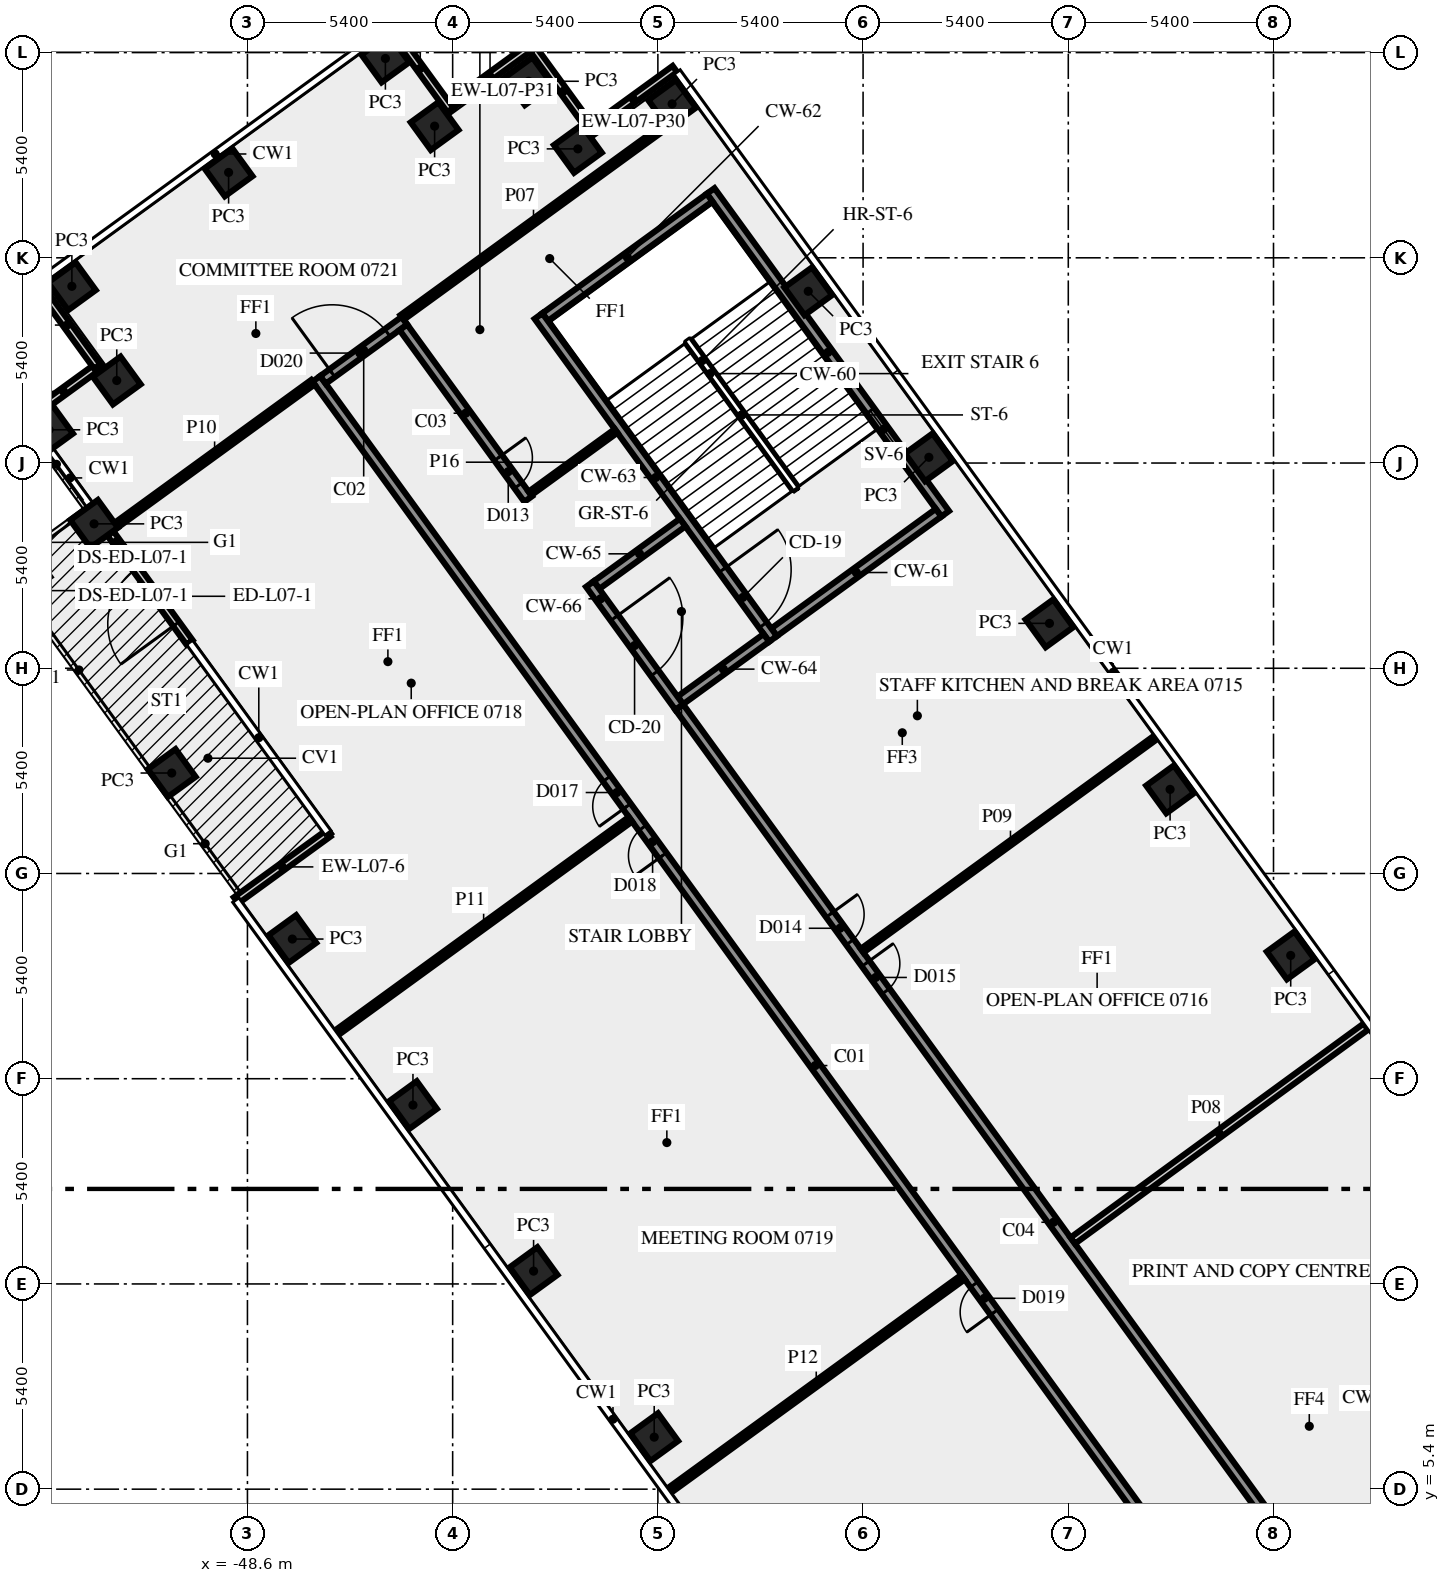
"""IFC4 building model, lengths in metres.
Left out: names, types, materials, properties, quantities, classifications, styles, units other than length and angle.
Written with IfcOpenShell. Run it as: python <this file> out.ifc"""

import sys

from ifc_helpers import new_model, si_unit, direction, frame, frame_2d, origin, origin_2d, place, context, subcontext, project, spatial, rectangle, extrude, element, fill, save


model = new_model("IFC4")
c1 = context("Model", 3, precision=1e-05, world=origin(), true_north=direction((0.0, 1.0)))
c2 = subcontext(c1, "Body", "Model", "MODEL_VIEW")
j1 = project(units=[si_unit("LENGTHUNIT", "METRE"), si_unit("PLANEANGLEUNIT", "RADIAN")], contexts=[c1])
p1 = place(None, origin())
s1 = spatial("IfcSite", under=j1, at=p1, CompositionType="ELEMENT")
p2 = place(p1, origin())
s2 = spatial("IfcBuilding", under=s1, at=p2, CompositionType="ELEMENT")
p3 = place(p2, frame((0.0, 0.0, 35.0)))
s3 = spatial("IfcBuildingStorey", under=s2, at=p3, CompositionType="ELEMENT", Elevation=35.0)
for number, where, z_axis, x_axis in (
    (1, (-21.147, 19.444, 0.0), (0.0, 0.0, 1.0), (-0.588, 0.809, 0.0)),
    (2, (-24.321, 23.812, 0.0), (0.0, 0.0, 1.0), (-0.588, 0.809, 0.0)),
    (3, (-27.495, 28.181, 0.0), (0.0, 0.0, 1.0), (-0.588, 0.809, 0.0)),
    (4, (-30.669, 32.55, 0.0), (0.0, 0.0, 1.0), (-0.588, 0.809, 0.0)),
    (5, (-33.843, 36.919, 0.0), (0.0, 0.0, 1.0), (-0.588, 0.809, 0.0)),
    (6, (-37.425, 41.85, 0.0), (0.0, 0.0, 1.0), (-0.588, 0.809, 0.0)),
    (7, (-39.906, 40.666, 0.0), (0.0, 0.0, 1.0), (-0.588, 0.809, 0.0)),
    (8, (-41.2, 42.445, 0.0), (0.0, 0.0, 1.0), (-0.588, 0.809, 0.0)),
    (9, (-43.675, 41.265, 0.0), (0.0, 0.0, 1.0), (-0.809, -0.588, 0.0)),
    (10, (-44.97, 43.045, 0.0), (0.0, 0.0, 1.0), (-0.809, -0.588, 0.0)),
    (11, (-49.096, 40.047, 0.0), (0.0, 0.0, 1.0), (-0.809, -0.588, 0.0)),
    (12, (-53.22, 37.05, 0.0), (0.0, 0.0, 1.0), (0.588, -0.809, 0.0)),
    (13, (-52.039, 34.571, 0.0), (0.0, 0.0, 1.0), (-0.809, -0.588, 0.0)),
    (14, (-53.82, 33.275, 0.0), (0.0, 0.0, 1.0), (0.588, -0.809, 0.0)),
    (15, (-52.636, 30.8, 0.0), (0.0, 0.0, 1.0), (-0.809, -0.588, 0.0)),
    (16, (-50.592, 24.243, 0.0), (0.0, 0.0, 1.0), (0.588, -0.809, 0.0)),
    (17, (-47.418, 19.875, 0.0), (0.0, 0.0, 1.0), (0.588, -0.809, 0.0)),
    (18, (-44.244, 15.506, 0.0), (0.0, 0.0, 1.0), (0.588, -0.809, 0.0)),
    (19, (-41.07, 11.137, 0.0), (0.0, 0.0, 1.0), (0.588, -0.809, 0.0)),
    (20, (-37.896, 6.769, 0.0), (0.0, 0.0, 1.0), (0.588, -0.809, 0.0)),
):
    element("IfcColumn", number, at=place(p3, frame(where, z_axis=z_axis, x_axis=x_axis)), inside=s3, PredefinedType="COLUMN", context=c2, shape_type="SweptSolid", body=[
        extrude(rectangle(XDim=0.9, YDim=0.9, at=origin_2d()), origin(), (0.0, 0.0, 1.0), 3.65),
    ])
p4 = place(p3, frame((-52.465, 34.987, 0.0), z_axis=(0.0, 0.0, 1.0), x_axis=(-0.809026317077, -0.587772420479, 0.0)))
e21 = element("IfcWall", 21, at=p4, inside=s3, PredefinedType="SOLIDWALL", context=c2, shape_type="SweptSolid", body=[
    extrude(rectangle(XDim=2.4, YDim=0.2, at=frame_2d((1.2, 0.0))), origin(), (0.0, 0.0, 1.0), 3.65),
])
p5 = place(p3, frame((-50.123, 27.68, 0.0), z_axis=(0.0, 0.0, 1.0), x_axis=(-0.587755461469, 0.809038637837, 0.0)))
e22 = element("IfcWall", 22, at=p5, inside=s3, PredefinedType="SOLIDWALL", context=c2, shape_type="SweptSolid", body=[
    extrude(rectangle(XDim=3.0, YDim=0.2, at=frame_2d((1.5, 0.0))), origin(), (0.0, 0.0, 1.0), 3.65),
])
p6 = place(p5, frame((0.6, 0.0, 0.0)))
e23 = element("IfcOpeningElement", 23, at=p6, cuts=e22, PredefinedType="OPENING", context=c2, shape_type="SweptSolid", body=[
    extrude(rectangle(XDim=1.8, YDim=2.4, at=frame_2d((0.9, 1.2))), frame((0.0, 0.11, 0.0), z_axis=(0.0, -1.0, 0.0), x_axis=(1.0, 0.0, 0.0)), (0.0, 0.0, 1.0), 0.22),
])
p7 = place(p3, frame((-46.472, 22.655, 0.0), z_axis=(0.0, 0.0, 1.0), x_axis=(-0.809038637837, -0.587755461469, 0.0)))
e24 = element("IfcWall", 24, at=p7, inside=s3, PredefinedType="SOLIDWALL", context=c2, shape_type="SweptSolid", body=[
    extrude(rectangle(XDim=3.0, YDim=0.2, at=frame_2d((1.5, 0.0))), origin(), (0.0, 0.0, 1.0), 3.65),
])
p8 = place(p3, frame((-37.353, 42.768, 0.0), z_axis=(0.0, 0.0, 1.0), x_axis=(-0.809033161865, -0.587762999008, 0.0)))
e25 = element("IfcWall", 25, at=p8, inside=s3, PredefinedType="SOLIDWALL", context=c2, shape_type="SweptSolid", body=[
    extrude(rectangle(XDim=2.7, YDim=0.2, at=frame_2d((1.35, 0.0))), origin(), (0.0, 0.0, 1.0), 3.65),
])
p9 = place(p3, frame((-39.488, 41.094, 0.0), z_axis=(0.0, 0.0, 1.0), x_axis=(-0.587806000234, 0.809001919707, 0.0)))
e26 = element("IfcWall", 26, at=p9, inside=s3, PredefinedType="SOLIDWALL", context=c2, shape_type="SweptSolid", body=[
    extrude(rectangle(XDim=2.7, YDim=0.2, at=frame_2d((1.35, 0.0))), origin(), (0.0, 0.0, 1.0), 3.65),
])
for number, where, z_axis, x_axis in (
    (27, (-41.124, 43.366, 0.0), (0.0, 0.0, 1.0), (-0.809, -0.588, 0.0)),
    (28, (-43.259, 41.691, 0.0), (0.0, 0.0, 1.0), (-0.588, 0.809, 0.0)),
    (29, (-54.14, 37.123, 0.0), (0.0, 0.0, 1.0), (0.588, -0.809, 0.0)),
):
    element("IfcWall", number, at=place(p3, frame(where, z_axis=z_axis, x_axis=x_axis)), inside=s3, PredefinedType="SOLIDWALL", context=c2, shape_type="SweptSolid", body=[
        extrude(rectangle(XDim=2.7, YDim=0.2, at=frame_2d((1.35, 0.0))), origin(), (0.0, 0.0, 1.0), 3.65),
    ])
p10 = place(p3, frame((-30.24, 31.064, 0.0), z_axis=(0.0, 0.0, 1.0), x_axis=(-0.587795589702, 0.809009483706, 0.0)))
e30 = element("IfcWall", 30, at=p10, inside=s3, PredefinedType="SHEAR", context=c2, shape_type="SweptSolid", body=[
    extrude(rectangle(XDim=10.5, YDim=0.25, at=frame_2d((5.25, 0.0))), origin(), (0.0, 0.0, 1.0), 3.65),
])
p11 = place(p10, frame((2.15, 0.0, 1.0)))
e31 = element("IfcOpeningElement", 31, at=p11, cuts=e30, PredefinedType="OPENING", context=c2, shape_type="SweptSolid", body=[
    extrude(rectangle(XDim=1.2, YDim=1.2, at=frame_2d((0.6, 0.6))), frame((0.0, 0.135, 0.0), z_axis=(0.0, -1.0, 0.0), x_axis=(1.0, 0.0, 0.0)), (0.0, 0.0, 1.0), 0.27),
])
p12 = place(p3, frame((-30.414, 31.092, 0.0), z_axis=(0.0, 0.0, 1.0), x_axis=(-0.8089984606, -0.587810760999, 0.0)))
e32 = element("IfcWall", 32, at=p12, inside=s3, PredefinedType="SHEAR", context=c2, shape_type="SweptSolid", body=[
    extrude(rectangle(XDim=5.35, YDim=0.25, at=frame_2d((2.675, 0.0))), origin(), (0.0, 0.0, 1.0), 3.65),
])
p13 = place(p3, frame((-36.439, 39.384, 0.0), z_axis=(0.0, 0.0, 1.0), x_axis=(-0.809020161303, -0.587780893365, 0.0)))
e33 = element("IfcWall", 33, at=p13, inside=s3, PredefinedType="SHEAR", context=c2, shape_type="SweptSolid", body=[
    extrude(rectangle(XDim=5.35, YDim=0.25, at=frame_2d((2.675, 0.0))), origin(), (0.0, 0.0, 1.0), 3.65),
])
p14 = place(p3, frame((-40.942, 36.267, 0.0), z_axis=(0.0, 0.0, 1.0), x_axis=(0.587795589702, -0.809009483706, 0.0)))
e34 = element("IfcWall", 34, at=p14, inside=s3, PredefinedType="SHEAR", context=c2, shape_type="SweptSolid", body=[
    extrude(rectangle(XDim=10.5, YDim=0.25, at=frame_2d((5.25, 0.0))), origin(), (0.0, 0.0, 1.0), 3.65),
])
p15 = place(p14, frame((8.25, 0.0, 0.0)))
e35 = element("IfcOpeningElement", 35, at=p15, cuts=e34, PredefinedType="OPENING", context=c2, shape_type="SweptSolid", body=[
    extrude(rectangle(XDim=1.8, YDim=2.1, at=frame_2d((0.9, 1.05))), frame((0.0, 0.135, 0.0), z_axis=(0.0, -1.0, 0.0), x_axis=(1.0, 0.0, 0.0)), (0.0, 0.0, 1.0), 0.27),
])
for number, where, z_axis, x_axis in (
    (36, (-34.945, 27.8, 0.0), (0.0, 0.0, 1.0), (-0.809, -0.588, 0.0)),
    (37, (-37.149, 30.834, 0.0), (0.0, 0.0, 1.0), (-0.809, -0.588, 0.0)),
):
    element("IfcWall", number, at=place(p3, frame(where, z_axis=z_axis, x_axis=x_axis)), inside=s3, PredefinedType="SHEAR", context=c2, shape_type="SweptSolid", body=[
        extrude(rectangle(XDim=2.8, YDim=0.25, at=frame_2d((1.4, 0.0))), origin(), (0.0, 0.0, 1.0), 3.65),
    ])
p16 = place(p3, frame((-39.589, 29.216, 0.0), z_axis=(0.0, 0.0, 1.0), x_axis=(0.587772420479, -0.809026317077, 0.0)))
e38 = element("IfcWall", 38, at=p16, inside=s3, PredefinedType="SHEAR", context=c2, shape_type="SweptSolid", body=[
    extrude(rectangle(XDim=4.0, YDim=0.25, at=frame_2d((2.0, 0.0))), origin(), (0.0, 0.0, 1.0), 3.65),
])
p17 = place(p16, frame((1.1, 0.0, 0.0)))
e39 = element("IfcOpeningElement", 39, at=p17, cuts=e38, PredefinedType="OPENING", context=c2, shape_type="SweptSolid", body=[
    extrude(rectangle(XDim=1.8, YDim=2.1, at=frame_2d((0.9, 1.05))), frame((0.0, 0.135, 0.0), z_axis=(0.0, -1.0, 0.0), x_axis=(1.0, 0.0, 0.0)), (0.0, 0.0, 1.0), 0.27),
])
p18 = place(p3, frame((-20.531, -1.523, 0.0), z_axis=(0.0, 0.0, 1.0), x_axis=(-0.587784593204, 0.809017473231, 0.0)))
e40 = element("IfcWall", 40, at=p18, inside=s3, PredefinedType="SOLIDWALL", context=c2, shape_type="SweptSolid", body=[
    extrude(rectangle(XDim=44.67, YDim=0.25, at=frame_2d((22.335, 0.0))), origin(), (0.0, 0.0, 1.0), 3.65),
])
p19 = place(p18, frame((30.765, 0.0, 0.0)))
e41 = element("IfcOpeningElement", 41, at=p19, cuts=e40, PredefinedType="OPENING", context=c2, shape_type="SweptSolid", body=[
    extrude(rectangle(XDim=0.9, YDim=2.1, at=frame_2d((0.45, 1.05))), frame((0.0, 0.135, 0.0), z_axis=(0.0, -1.0, 0.0), x_axis=(1.0, 0.0, 0.0)), (0.0, 0.0, 1.0), 0.27),
])
p20 = place(p18, frame((14.316, 0.0, 0.0)))
e42 = element("IfcOpeningElement", 42, at=p20, cuts=e40, PredefinedType="OPENING", context=c2, shape_type="SweptSolid", body=[
    extrude(rectangle(XDim=0.9, YDim=2.1, at=frame_2d((0.45, 1.05))), frame((0.0, 0.135, 0.0), z_axis=(0.0, -1.0, 0.0), x_axis=(1.0, 0.0, 0.0)), (0.0, 0.0, 1.0), 0.27),
])
p21 = place(p18, frame((29.166, 0.0, 0.0)))
e43 = element("IfcOpeningElement", 43, at=p21, cuts=e40, PredefinedType="OPENING", context=c2, shape_type="SweptSolid", body=[
    extrude(rectangle(XDim=0.9, YDim=2.1, at=frame_2d((0.45, 1.05))), frame((0.0, 0.135, 0.0), z_axis=(0.0, -1.0, 0.0), x_axis=(1.0, 0.0, 0.0)), (0.0, 0.0, 1.0), 0.27),
])
p22 = place(p3, frame((-46.613, 34.588, 0.0), z_axis=(0.0, 0.0, 1.0), x_axis=(0.808994936898, 0.587815610607, 0.0)))
e44 = element("IfcWall", 44, at=p22, inside=s3, PredefinedType="SOLIDWALL", context=c2, shape_type="SweptSolid", body=[
    extrude(rectangle(XDim=2.65, YDim=0.25, at=frame_2d((1.325, 0.0))), origin(), (0.0, 0.0, 1.0), 3.65),
])
p23 = place(p22, frame((0.299, 0.0, 0.0)))
e45 = element("IfcOpeningElement", 45, at=p23, cuts=e44, PredefinedType="OPENING", context=c2, shape_type="SweptSolid", body=[
    extrude(rectangle(XDim=1.8, YDim=2.1, at=frame_2d((0.9, 1.05))), frame((0.0, 0.135, 0.0), z_axis=(0.0, -1.0, 0.0), x_axis=(1.0, 0.0, 0.0)), (0.0, 0.0, 1.0), 0.27),
])
p24 = place(p3, frame((-44.497, 35.971, 0.0), z_axis=(0.0, 0.0, 1.0), x_axis=(0.587742866856, -0.809047787501, 0.0)))
e46 = element("IfcWall", 46, at=p24, inside=s3, PredefinedType="SOLIDWALL", context=c2, shape_type="SweptSolid", body=[
    extrude(rectangle(XDim=5.586, YDim=0.25, at=frame_2d((2.793, 0.0))), origin(), (0.0, 0.0, 1.0), 3.65),
])
p25 = place(p24, frame((4.245, 0.0, 0.0)))
e47 = element("IfcOpeningElement", 47, at=p25, cuts=e46, PredefinedType="OPENING", context=c2, shape_type="SweptSolid", body=[
    extrude(rectangle(XDim=0.9, YDim=2.1, at=frame_2d((0.45, 1.05))), frame((0.0, 0.135, 0.0), z_axis=(0.0, -1.0, 0.0), x_axis=(1.0, 0.0, 0.0)), (0.0, 0.0, 1.0), 0.27),
])
p26 = place(p3, frame((-37.232, 25.972, 0.0), z_axis=(0.0, 0.0, 1.0), x_axis=(0.587786323093, -0.809016216391, 0.0)))
e48 = element("IfcWall", 48, at=p26, inside=s3, PredefinedType="SOLIDWALL", context=c2, shape_type="SweptSolid", body=[
    extrude(rectangle(XDim=33.493, YDim=0.25, at=frame_2d((16.747, 0.0))), origin(), (0.0, 0.0, 1.0), 3.65),
])
p27 = place(p26, frame((8.335, 0.0, 0.0)))
e49 = element("IfcOpeningElement", 49, at=p27, cuts=e48, PredefinedType="OPENING", context=c2, shape_type="SweptSolid", body=[
    extrude(rectangle(XDim=0.9, YDim=2.1, at=frame_2d((0.45, 1.05))), frame((0.0, 0.135, 0.0), z_axis=(0.0, -1.0, 0.0), x_axis=(1.0, 0.0, 0.0)), (0.0, 0.0, 1.0), 0.27),
])
p28 = place(p26, frame((29.152, 0.0, 0.0)))
e50 = element("IfcOpeningElement", 50, at=p28, cuts=e48, PredefinedType="OPENING", context=c2, shape_type="SweptSolid", body=[
    extrude(rectangle(XDim=0.9, YDim=2.1, at=frame_2d((0.45, 1.05))), frame((0.0, 0.135, 0.0), z_axis=(0.0, -1.0, 0.0), x_axis=(1.0, 0.0, 0.0)), (0.0, 0.0, 1.0), 0.27),
])
p29 = place(p26, frame((6.735, 0.0, 0.0)))
e51 = element("IfcOpeningElement", 51, at=p29, cuts=e48, PredefinedType="OPENING", context=c2, shape_type="SweptSolid", body=[
    extrude(rectangle(XDim=0.9, YDim=2.1, at=frame_2d((0.45, 1.05))), frame((0.0, 0.135, 0.0), z_axis=(0.0, -1.0, 0.0), x_axis=(1.0, 0.0, 0.0)), (0.0, 0.0, 1.0), 0.27),
])
p30 = place(p3, frame((-37.614, 41.257, 0.0), z_axis=(0.0, 0.0, 1.0), x_axis=(-0.808991595707, -0.587820208972, 0.0)))
e52 = element("IfcWall", 52, at=p30, inside=s3, PredefinedType="PARTITIONING", context=c2, shape_type="SweptSolid", body=[
    extrude(rectangle(XDim=8.551, YDim=0.15, at=frame_2d((4.275, 0.0))), origin(), (0.0, 0.0, 1.0), 3.65),
])
p31 = place(p3, frame((-26.882, 11.94, 0.0), z_axis=(0.0, 0.0, 1.0), x_axis=(0.807664588563, 0.589642190131, 0.0)))
e53 = element("IfcWall", 53, at=p31, inside=s3, PredefinedType="SOLIDWALL", context=c2, shape_type="SweptSolid", body=[
    extrude(rectangle(XDim=9.55, YDim=0.2, at=frame_2d((4.775, 0.0))), origin(), (0.0, 0.0, 1.0), 2.75),
])
p32 = place(p3, frame((-24.618, 25.242, 0.0), z_axis=(0.0, 0.0, 1.0), x_axis=(-0.809002920164, -0.587804623294, 0.0)))
e54 = element("IfcWall", 54, at=p32, inside=s3, PredefinedType="PARTITIONING", context=c2, shape_type="SweptSolid", body=[
    extrude(rectangle(XDim=9.651, YDim=0.12, at=frame_2d((4.825, 0.0))), origin(), (0.0, 0.0, 1.0), 2.75),
])
p33 = place(p3, frame((-46.877, 34.526, 0.0), z_axis=(0.0, 0.0, 1.0), x_axis=(-0.809011722304, -0.587792508607, 0.0)))
e55 = element("IfcWall", 55, at=p33, inside=s3, PredefinedType="PARTITIONING", context=c2, shape_type="SweptSolid", body=[
    extrude(rectangle(XDim=6.394, YDim=0.15, at=frame_2d((3.197, 0.0))), origin(), (0.0, 0.0, 1.0), 3.65),
])
p34 = place(p3, frame((-46.248, 17.413, 0.0), z_axis=(0.0, 0.0, 1.0), x_axis=(0.80900684162, 0.587799226107, 0.0)))
e56 = element("IfcWall", 56, at=p34, inside=s3, PredefinedType="PARTITIONING", context=c2, shape_type="SweptSolid", body=[
    extrude(rectangle(XDim=9.55, YDim=0.15, at=frame_2d((4.775, 0.0))), origin(), (0.0, 0.0, 1.0), 2.75),
])
p35 = place(p3, frame((-29.769, 10.98, 0.0), z_axis=(0.0, 0.0, 1.0), x_axis=(-0.809048817734, -0.587741448702, 0.0)))
e57 = element("IfcWall", 57, at=p35, inside=s3, PredefinedType="PARTITIONING", context=c2, shape_type="SweptSolid", body=[
    extrude(rectangle(XDim=9.55, YDim=0.15, at=frame_2d((4.775, 0.0))), origin(), (0.0, 0.0, 1.0), 2.75),
])
p36 = place(p3, frame((-41.166, 31.599, 0.0), z_axis=(0.0, 0.0, 1.0), x_axis=(0.809090262332, 0.587684394381, 0.0)))
e58 = element("IfcWall", 58, at=p36, inside=s3, PredefinedType="PARTITIONING", context=c2, shape_type="SweptSolid", body=[
    extrude(rectangle(XDim=2.801, YDim=0.12, at=frame_2d((1.4, 0.0))), origin(), (0.0, 0.0, 1.0), 3.65),
])
p37 = place(p3, frame((-51.887, 30.107, 0.0), z_axis=(0.0, 0.0, 1.0), x_axis=(-0.587825586486, 0.808987688332, 0.0)))
e59 = element("IfcWall", 59, at=p37, inside=s3, PredefinedType="SOLIDWALL", context=c2, shape_type="SweptSolid", body=[
    extrude(rectangle(XDim=0.545, YDim=0.2, at=frame_2d((0.273, 0.0))), origin(), (0.0, 0.0, 1.0), 3.65),
])
p38 = place(p6, origin())
e60 = element("IfcDoor", 60, at=p38, inside=s3, OperationType="DOUBLE_DOOR_SINGLE_SWING", PredefinedType="DOOR", context=c2, shape_type="SweptSolid", body=[
    extrude(rectangle(XDim=1.8, YDim=2.4, at=frame_2d((0.9, 1.2))), frame((0.0, 0.025, 0.0), z_axis=(0.0, -1.0, 0.0), x_axis=(1.0, 0.0, 0.0)), (0.0, 0.0, 1.0), 0.05),
])
fill(e23, e60)
p39 = place(p11, origin())
e61 = element("IfcWindow", 61, at=p39, inside=s3, PartitioningType="SINGLE_PANEL", PredefinedType="WINDOW", context=c2, shape_type="SweptSolid", body=[
    extrude(rectangle(XDim=1.2, YDim=1.2, at=frame_2d((0.6, 0.6))), frame((0.0, 0.03, 0.0), z_axis=(0.0, -1.0, 0.0), x_axis=(1.0, 0.0, 0.0)), (0.0, 0.0, 1.0), 0.06),
])
fill(e31, e61)
p40 = place(p15, origin())
e62 = element("IfcDoor", 62, at=p40, inside=s3, OperationType="DOUBLE_DOOR_SINGLE_SWING", PredefinedType="DOOR", context=c2, shape_type="SweptSolid", body=[
    extrude(rectangle(XDim=1.8, YDim=2.1, at=frame_2d((0.9, 1.05))), frame((0.0, 0.025, 0.0), z_axis=(0.0, -1.0, 0.0), x_axis=(1.0, 0.0, 0.0)), (0.0, 0.0, 1.0), 0.05),
])
fill(e35, e62)
p41 = place(p17, origin())
e63 = element("IfcDoor", 63, at=p41, inside=s3, OperationType="DOUBLE_DOOR_SINGLE_SWING", PredefinedType="DOOR", context=c2, shape_type="SweptSolid", body=[
    extrude(rectangle(XDim=1.8, YDim=2.1, at=frame_2d((0.9, 1.05))), frame((0.0, 0.025, 0.0), z_axis=(0.0, -1.0, 0.0), x_axis=(1.0, 0.0, 0.0)), (0.0, 0.0, 1.0), 0.05),
])
fill(e39, e63)
p42 = place(p25, origin())
e64 = element("IfcDoor", 64, at=p42, inside=s3, OperationType="SINGLE_SWING_RIGHT", PredefinedType="DOOR", context=c2, shape_type="SweptSolid", body=[
    extrude(rectangle(XDim=0.9, YDim=2.1, at=frame_2d((0.45, 1.05))), frame((0.0, 0.025, 0.0), z_axis=(0.0, -1.0, 0.0), x_axis=(1.0, 0.0, 0.0)), (0.0, 0.0, 1.0), 0.05),
])
fill(e47, e64)
p43 = place(p27, origin())
e65 = element("IfcDoor", 65, at=p43, inside=s3, OperationType="SINGLE_SWING_LEFT", PredefinedType="DOOR", context=c2, shape_type="SweptSolid", body=[
    extrude(rectangle(XDim=0.9, YDim=2.1, at=frame_2d((0.45, 1.05))), frame((0.0, 0.025, 0.0), z_axis=(0.0, -1.0, 0.0), x_axis=(1.0, 0.0, 0.0)), (0.0, 0.0, 1.0), 0.05),
])
fill(e49, e65)
p44 = place(p19, origin())
e66 = element("IfcDoor", 66, at=p44, inside=s3, OperationType="SINGLE_SWING_LEFT", PredefinedType="DOOR", context=c2, shape_type="SweptSolid", body=[
    extrude(rectangle(XDim=0.9, YDim=2.1, at=frame_2d((0.45, 1.05))), frame((0.0, 0.025, 0.0), z_axis=(0.0, -1.0, 0.0), x_axis=(1.0, 0.0, 0.0)), (0.0, 0.0, 1.0), 0.05),
])
fill(e41, e66)
p45 = place(p20, origin())
e67 = element("IfcDoor", 67, at=p45, inside=s3, OperationType="SINGLE_SWING_RIGHT", PredefinedType="DOOR", context=c2, shape_type="SweptSolid", body=[
    extrude(rectangle(XDim=0.9, YDim=2.1, at=frame_2d((0.45, 1.05))), frame((0.0, 0.025, 0.0), z_axis=(0.0, -1.0, 0.0), x_axis=(1.0, 0.0, 0.0)), (0.0, 0.0, 1.0), 0.05),
])
fill(e42, e67)
p46 = place(p23, origin())
e68 = element("IfcDoor", 68, at=p46, inside=s3, OperationType="DOUBLE_DOOR_SINGLE_SWING", PredefinedType="DOOR", context=c2, shape_type="SweptSolid", body=[
    extrude(rectangle(XDim=1.8, YDim=2.1, at=frame_2d((0.9, 1.05))), frame((0.0, 0.025, 0.0), z_axis=(0.0, -1.0, 0.0), x_axis=(1.0, 0.0, 0.0)), (0.0, 0.0, 1.0), 0.05),
])
fill(e45, e68)
p47 = place(p21, origin())
e69 = element("IfcDoor", 69, at=p47, inside=s3, OperationType="SINGLE_SWING_RIGHT", PredefinedType="DOOR", context=c2, shape_type="SweptSolid", body=[
    extrude(rectangle(XDim=0.9, YDim=2.1, at=frame_2d((0.45, 1.05))), frame((0.0, 0.025, 0.0), z_axis=(0.0, -1.0, 0.0), x_axis=(1.0, 0.0, 0.0)), (0.0, 0.0, 1.0), 0.05),
])
fill(e43, e69)
p48 = place(p29, origin())
e70 = element("IfcDoor", 70, at=p48, inside=s3, OperationType="SINGLE_SWING_RIGHT", PredefinedType="DOOR", context=c2, shape_type="SweptSolid", body=[
    extrude(rectangle(XDim=0.9, YDim=2.1, at=frame_2d((0.45, 1.05))), frame((0.0, 0.025, 0.0), z_axis=(0.0, -1.0, 0.0), x_axis=(1.0, 0.0, 0.0)), (0.0, 0.0, 1.0), 0.05),
])
fill(e51, e70)
save(model, sys.argv[1])
